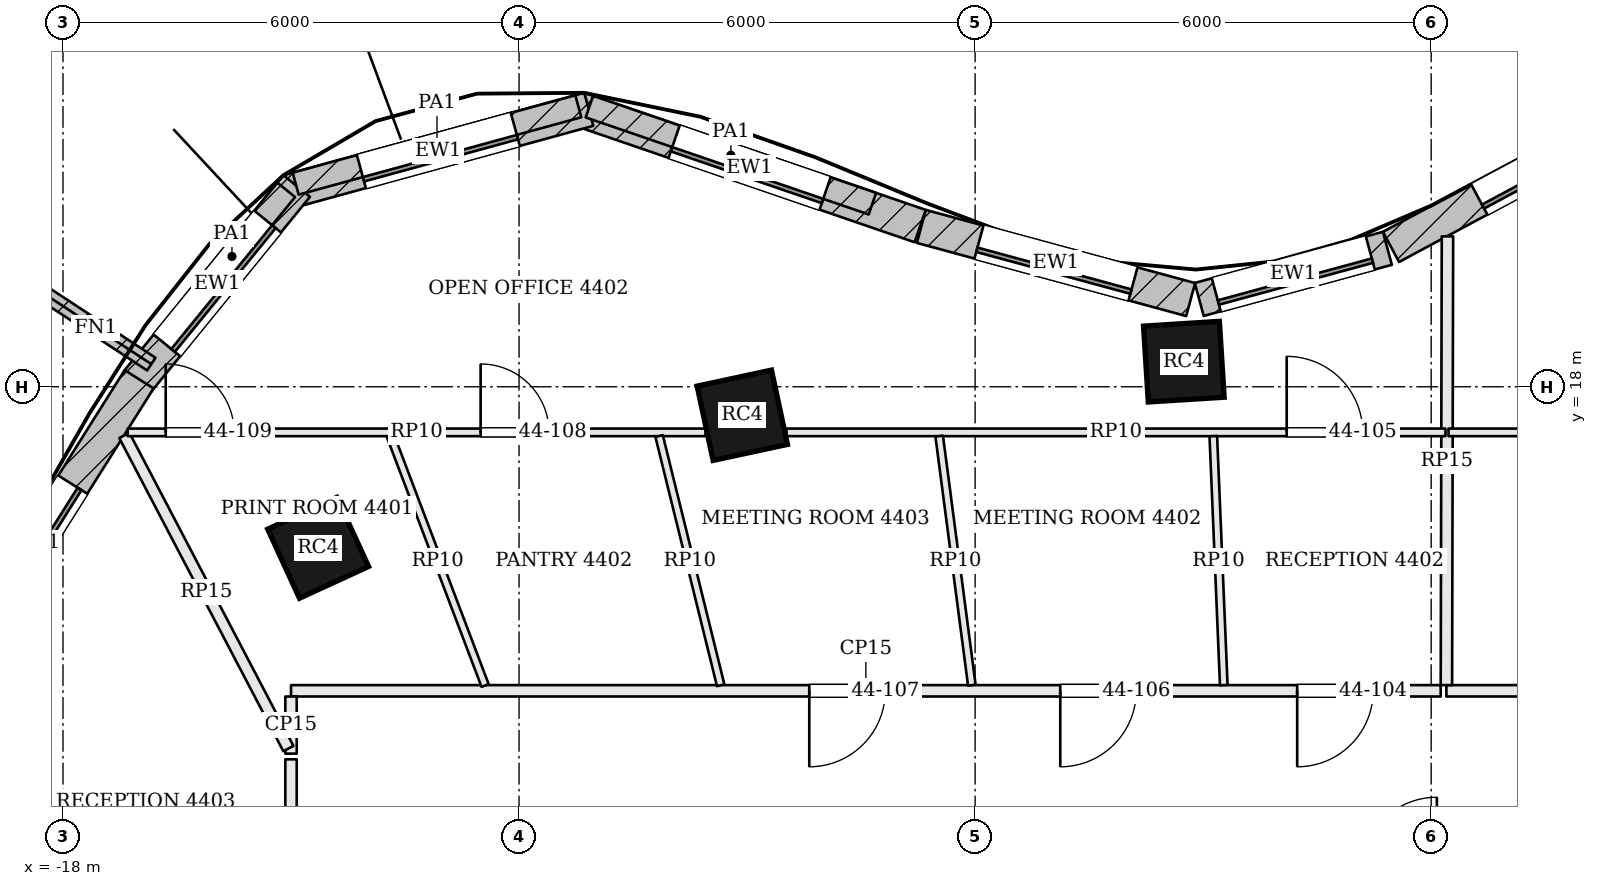
"""IFC4 building model, lengths in metres.
Left out: names, types, materials, properties, quantities, classifications, styles, units other than length and angle.
Written with IfcOpenShell. Run it as: python <this file> out.ifc"""

import sys

from ifc_helpers import new_model, si_unit, direction, frame, frame_2d, origin, origin_2d, place, context, subcontext, project, spatial, rectangle, extrude, element, fill, save


model = new_model("IFC4")
c1 = context("Model", 3, precision=1e-05, world=origin(), true_north=direction((0.0, 1.0)))
c2 = subcontext(c1, "Body", "Model", "MODEL_VIEW")
j1 = project(units=[si_unit("LENGTHUNIT", "METRE"), si_unit("PLANEANGLEUNIT", "RADIAN")], contexts=[c1])
p1 = place(None, origin())
s1 = spatial("IfcSite", under=j1, at=p1, CompositionType="ELEMENT")
p2 = place(p1, origin())
s2 = spatial("IfcBuilding", under=s1, at=p2, CompositionType="ELEMENT")
p3 = place(p2, frame((0.0, 0.0, 181.8)))
s3 = spatial("IfcBuildingStorey", under=s2, at=p3, CompositionType="ELEMENT", Elevation=181.8)
for number, where, z_axis, x_axis in (
    (1, (-3.254, 18.33, 0.0), (0.0, 0.0, 1.0), (-0.998, -0.063, 0.0)),
    (2, (-9.063, 17.625, 0.0), (0.0, 0.0, 1.0), (-0.978, -0.21, 0.0)),
    (3, (-14.643, 15.881, 0.0), (0.0, 0.0, 1.0), (-0.909, -0.417, 0.0)),
):
    element("IfcColumn", number, at=place(p3, frame(where, z_axis=z_axis, x_axis=x_axis)), inside=s3, PredefinedType="COLUMN", context=c2, shape_type="SweptSolid", body=[
        extrude(rectangle(XDim=1.0, YDim=1.0, at=origin_2d()), origin(), (0.0, 0.0, 1.0), 3.9),
    ])
p4 = place(p3, frame((3.646, 22.079, 0.0), z_axis=(0.0, 0.0, 1.0), x_axis=(-0.881279133897, -0.472596115259, 0.0)))
e4 = element("IfcWall", 4, at=p4, inside=s3, PredefinedType="SOLIDWALL", context=c2, shape_type="SweptSolid", body=[
    extrude(rectangle(XDim=4.737, YDim=0.45, at=frame_2d((2.368, 0.0))), origin(), (0.0, 0.0, 1.0), 3.7),
])
p5 = place(p4, frame((1.318, 0.0, 0.9)))
e5 = element("IfcOpeningElement", 5, at=p5, cuts=e4, PredefinedType="OPENING", context=c2, shape_type="SweptSolid", body=[
    extrude(rectangle(XDim=2.1, YDim=2.3, at=frame_2d((1.05, 1.15))), frame((0.0, 0.235, 0.0), z_axis=(0.0, -1.0, 0.0), x_axis=(1.0, 0.0, 0.0)), (0.0, 0.0, 1.0), 0.47),
])
p6 = place(p3, frame((-0.576, 19.821, 0.0), z_axis=(0.0, 0.0, 1.0), x_axis=(-0.965009398019, -0.262215296532, 0.0)))
e6 = element("IfcWall", 6, at=p6, inside=s3, PredefinedType="SOLIDWALL", context=c2, shape_type="SweptSolid", body=[
    extrude(rectangle(XDim=2.565, YDim=0.45, at=frame_2d((1.283, 0.0))), origin(), (0.0, 0.0, 1.0), 3.7),
])
p7 = place(p6, frame((0.233, 0.0, 0.9)))
e7 = element("IfcOpeningElement", 7, at=p7, cuts=e6, PredefinedType="OPENING", context=c2, shape_type="SweptSolid", body=[
    extrude(rectangle(XDim=2.1, YDim=2.3, at=frame_2d((1.05, 1.15))), frame((0.0, 0.235, 0.0), z_axis=(0.0, -1.0, 0.0), x_axis=(1.0, 0.0, 0.0)), (0.0, 0.0, 1.0), 0.47),
])
p8 = place(p3, frame((-3.164, 19.147, 0.0), z_axis=(0.0, 0.0, 1.0), x_axis=(-0.965039479998, 0.262104563191, 0.0)))
e8 = element("IfcWall", 8, at=p8, inside=s3, PredefinedType="SOLIDWALL", context=c2, shape_type="SweptSolid", body=[
    extrude(rectangle(XDim=3.672, YDim=0.45, at=frame_2d((1.836, 0.0))), origin(), (0.0, 0.0, 1.0), 3.7),
])
p9 = place(p8, frame((0.786, 0.0, 0.9)))
e9 = element("IfcOpeningElement", 9, at=p9, cuts=e8, PredefinedType="OPENING", context=c2, shape_type="SweptSolid", body=[
    extrude(rectangle(XDim=2.1, YDim=2.3, at=frame_2d((1.05, 1.15))), frame((0.0, 0.235, 0.0), z_axis=(0.0, -1.0, 0.0), x_axis=(1.0, 0.0, 0.0)), (0.0, 0.0, 1.0), 0.47),
])
p10 = place(p3, frame((-6.723, 20.114, 0.0), z_axis=(0.0, 0.0, 1.0), x_axis=(-0.945947299026, 0.324320377815, 0.0)))
e10 = element("IfcWall", 10, at=p10, inside=s3, PredefinedType="SOLIDWALL", context=c2, shape_type="SweptSolid", body=[
    extrude(rectangle(XDim=4.745, YDim=0.45, at=frame_2d((2.372, 0.0))), origin(), (0.0, 0.0, 1.0), 3.7),
])
p11 = place(p10, frame((1.322, 0.0, 0.9)))
e11 = element("IfcOpeningElement", 11, at=p11, cuts=e10, PredefinedType="OPENING", context=c2, shape_type="SweptSolid", body=[
    extrude(rectangle(XDim=2.1, YDim=2.3, at=frame_2d((1.05, 1.15))), frame((0.0, 0.235, 0.0), z_axis=(0.0, -1.0, 0.0), x_axis=(1.0, 0.0, 0.0)), (0.0, 0.0, 1.0), 0.47),
])
p12 = place(p3, frame((-11.083, 21.65, 0.0), z_axis=(0.0, 0.0, 1.0), x_axis=(-0.964483204983, -0.264144179011, 0.0)))
e12 = element("IfcWall", 12, at=p12, inside=s3, PredefinedType="SOLIDWALL", context=c2, shape_type="SweptSolid", body=[
    extrude(rectangle(XDim=4.104, YDim=0.45, at=frame_2d((2.052, 0.0))), origin(), (0.0, 0.0, 1.0), 3.7),
])
p13 = place(p12, frame((1.002, 0.0, 0.9)))
e13 = element("IfcOpeningElement", 13, at=p13, cuts=e12, PredefinedType="OPENING", context=c2, shape_type="SweptSolid", body=[
    extrude(rectangle(XDim=2.1, YDim=2.3, at=frame_2d((1.05, 1.15))), frame((0.0, 0.235, 0.0), z_axis=(0.0, -1.0, 0.0), x_axis=(1.0, 0.0, 0.0)), (0.0, 0.0, 1.0), 0.47),
])
p14 = place(p3, frame((-14.926, 20.641, 0.0), z_axis=(0.0, 0.0, 1.0), x_axis=(-0.631548074669, -0.775336720001, 0.0)))
e14 = element("IfcWall", 14, at=p14, inside=s3, PredefinedType="SOLIDWALL", context=c2, shape_type="SweptSolid", body=[
    extrude(rectangle(XDim=3.308, YDim=0.45, at=frame_2d((1.654, 0.0))), origin(), (0.0, 0.0, 1.0), 3.7),
])
p15 = place(p14, frame((0.604, 0.0, 0.9)))
e15 = element("IfcOpeningElement", 15, at=p15, cuts=e14, PredefinedType="OPENING", context=c2, shape_type="SweptSolid", body=[
    extrude(rectangle(XDim=2.1, YDim=2.3, at=frame_2d((1.05, 1.15))), frame((0.0, 0.235, 0.0), z_axis=(0.0, -1.0, 0.0), x_axis=(1.0, 0.0, 0.0)), (0.0, 0.0, 1.0), 0.47),
])
p16 = place(p3, frame((-16.998, 18.099, 0.0), z_axis=(0.0, 0.0, 1.0), x_axis=(-0.532745661304, -0.846275404559, 0.0)))
e16 = element("IfcWall", 16, at=p16, inside=s3, PredefinedType="SOLIDWALL", context=c2, shape_type="SweptSolid", body=[
    extrude(rectangle(XDim=5.076, YDim=0.45, at=frame_2d((2.538, 0.0))), origin(), (0.0, 0.0, 1.0), 3.7),
])
p17 = place(p16, frame((1.638, 0.0, 0.9)))
e17 = element("IfcOpeningElement", 17, at=p17, cuts=e16, PredefinedType="OPENING", context=c2, shape_type="SweptSolid", body=[
    extrude(rectangle(XDim=1.8, YDim=2.3, at=frame_2d((0.9, 1.15))), frame((0.0, 0.235, 0.0), z_axis=(0.0, -1.0, 0.0), x_axis=(1.0, 0.0, 0.0)), (0.0, 0.0, 1.0), 0.47),
])
p18 = place(p3, frame((-16.838, 18.298, 0.0), z_axis=(0.0, 0.0, 1.0), x_axis=(-0.835871900419, 0.548924554097, 0.0)))
e18 = element("IfcWall", 18, at=p18, inside=s3, PredefinedType="SOLIDWALL", context=c2, shape_type="SweptSolid", body=[
    extrude(rectangle(XDim=1.75, YDim=0.2, at=frame_2d((0.875, 0.0))), origin(), (0.0, 0.0, 1.0), 3.7),
])
p19 = place(p3, frame((-7.352, 20.409, 3.9), z_axis=(0.0, 0.0, 1.0), x_axis=(-0.945937789937, 0.32434811171, 0.0)))
e19 = element("IfcWall", 19, at=p19, inside=s3, PredefinedType="PARAPET", context=c2, shape_type="SweptSolid", body=[
    extrude(rectangle(XDim=3.936, YDim=0.3, at=frame_2d((1.968, 0.0))), origin(), (0.0, 0.0, 1.0), 1.1),
])
p20 = place(p3, frame((-11.22, 21.69, 3.9), z_axis=(0.0, 0.0, 1.0), x_axis=(-0.964484148392, -0.264140734271, 0.0)))
e20 = element("IfcWall", 20, at=p20, inside=s3, PredefinedType="PARAPET", context=c2, shape_type="SweptSolid", body=[
    extrude(rectangle(XDim=3.855, YDim=0.3, at=frame_2d((1.928, 0.0))), origin(), (0.0, 0.0, 1.0), 1.1),
])
p21 = place(p3, frame((-15.063, 20.591, 3.9), z_axis=(0.0, 0.0, 1.0), x_axis=(-0.631559943447, -0.775327052174, 0.0)))
e21 = element("IfcWall", 21, at=p21, inside=s3, PredefinedType="PARAPET", context=c2, shape_type="SweptSolid", body=[
    extrude(rectangle(XDim=2.26, YDim=0.3, at=frame_2d((1.13, 0.0))), origin(), (0.0, 0.0, 1.0), 1.1),
])
p22 = place(p3, frame((14.925, 14.0, 0.0), z_axis=(0.0, 0.0, 1.0), x_axis=(-1.0, 0.0, 0.0)))
e22 = element("IfcWall", 22, at=p22, inside=s3, PredefinedType="PARTITIONING", context=c2, shape_type="SweptSolid", body=[
    extrude(rectangle(XDim=14.725, YDim=0.15, at=frame_2d((7.362, 0.0))), origin(), (0.0, 0.0, 1.0), 3.084),
])
p23 = place(p22, frame((5.495, 0.0, 0.0)))
e23 = element("IfcOpeningElement", 23, at=p23, cuts=e22, PredefinedType="OPENING", context=c2, shape_type="SweptSolid", body=[
    extrude(rectangle(XDim=1.0, YDim=2.4, at=frame_2d((0.5, 1.2))), frame((0.0, 0.085, 0.0), z_axis=(0.0, -1.0, 0.0), x_axis=(1.0, 0.0, 0.0)), (0.0, 0.0, 1.0), 0.17),
])
p24 = place(p22, frame((11.15, 0.0, 0.0)))
e24 = element("IfcOpeningElement", 24, at=p24, cuts=e22, PredefinedType="OPENING", context=c2, shape_type="SweptSolid", body=[
    extrude(rectangle(XDim=1.0, YDim=2.1, at=frame_2d((0.5, 1.05))), frame((0.0, 0.085, 0.0), z_axis=(0.0, -1.0, 0.0), x_axis=(1.0, 0.0, 0.0)), (0.0, 0.0, 1.0), 0.17),
])
p25 = place(p3, frame((0.214, 19.979, 0.0), z_axis=(0.0, 0.0, 1.0), x_axis=(-0.002357118586, -0.999997221992, 0.0)))
e25 = element("IfcWall", 25, at=p25, inside=s3, PredefinedType="PARTITIONING", context=c2, shape_type="SweptSolid", body=[
    extrude(rectangle(XDim=5.904, YDim=0.15, at=frame_2d((2.952, 0.0))), origin(), (0.0, 0.0, 1.0), 3.234),
])
p26 = place(p3, frame((0.125, 14.0, 0.0), z_axis=(0.0, 0.0, 1.0), x_axis=(-1.0, 0.0, 0.0)))
e26 = element("IfcWall", 26, at=p26, inside=s3, PredefinedType="PARTITIONING", context=c2, shape_type="SweptSolid", body=[
    extrude(rectangle(XDim=15.125, YDim=0.15, at=frame_2d((7.562, 0.0))), origin(), (0.0, 0.0, 1.0), 3.084),
])
p27 = place(p26, frame((0.888, 0.0, 0.0)))
e27 = element("IfcOpeningElement", 27, at=p27, cuts=e26, PredefinedType="OPENING", context=c2, shape_type="SweptSolid", body=[
    extrude(rectangle(XDim=1.0, YDim=2.1, at=frame_2d((0.5, 1.05))), frame((0.0, 0.085, 0.0), z_axis=(0.0, -1.0, 0.0), x_axis=(1.0, 0.0, 0.0)), (0.0, 0.0, 1.0), 0.17),
])
p28 = place(p26, frame((4.005, 0.0, 0.0)))
e28 = element("IfcOpeningElement", 28, at=p28, cuts=e26, PredefinedType="OPENING", context=c2, shape_type="SweptSolid", body=[
    extrude(rectangle(XDim=1.0, YDim=2.4, at=frame_2d((0.5, 1.2))), frame((0.0, 0.085, 0.0), z_axis=(0.0, -1.0, 0.0), x_axis=(1.0, 0.0, 0.0)), (0.0, 0.0, 1.0), 0.17),
])
p29 = place(p26, frame((7.307, 0.0, 0.0)))
e29 = element("IfcOpeningElement", 29, at=p29, cuts=e26, PredefinedType="OPENING", context=c2, shape_type="SweptSolid", body=[
    extrude(rectangle(XDim=1.0, YDim=2.4, at=frame_2d((0.5, 1.2))), frame((0.0, 0.085, 0.0), z_axis=(0.0, -1.0, 0.0), x_axis=(1.0, 0.0, 0.0)), (0.0, 0.0, 1.0), 0.17),
])
p30 = place(p3, frame((-15.0, 13.925, 0.0), z_axis=(0.0, 0.0, 1.0), x_axis=(0.0, -1.0, 0.0)))
e30 = element("IfcWall", 30, at=p30, inside=s3, PredefinedType="PARTITIONING", context=c2, shape_type="SweptSolid", body=[
    extrude(rectangle(XDim=0.751, YDim=0.15, at=frame_2d((0.376, 0.0))), origin(), (0.0, 0.0, 1.0), 3.084),
])
p31 = place(p3, frame((-17.193, 17.36, 0.0), z_axis=(0.0, 0.0, 1.0), x_axis=(0.463995225493, -0.885837699988, 0.0)))
e31 = element("IfcWall", 31, at=p31, inside=s3, PredefinedType="PARTITIONING", context=c2, shape_type="SweptSolid", body=[
    extrude(rectangle(XDim=4.651, YDim=0.15, at=frame_2d((2.325, 0.0))), origin(), (0.0, 0.0, 1.0), 3.234),
])
p32 = place(p3, frame((-15.0, 13.099, 0.0), z_axis=(0.0, 0.0, 1.0), x_axis=(0.0, -1.0, 0.0)))
e32 = element("IfcWall", 32, at=p32, inside=s3, PredefinedType="PARTITIONING", context=c2, shape_type="SweptSolid", body=[
    extrude(rectangle(XDim=2.977, YDim=0.15, at=frame_2d((1.489, 0.0))), origin(), (0.0, 0.0, 1.0), 3.084),
])
p33 = place(p3, frame((0.228, 17.4, 0.0), z_axis=(0.0, 0.0, 1.0), x_axis=(1.0, 0.0, 0.0)))
e33 = element("IfcWall", 33, at=p33, inside=s3, PredefinedType="PARTITIONING", context=c2, shape_type="SweptSolid", body=[
    extrude(rectangle(XDim=7.596, YDim=0.1, at=frame_2d((3.798, 0.0))), origin(), (0.0, 0.0, 1.0), 3.084),
])
p34 = place(p33, frame((3.894, 0.0, 0.0)))
e34 = element("IfcOpeningElement", 34, at=p34, cuts=e33, PredefinedType="OPENING", context=c2, shape_type="SweptSolid", body=[
    extrude(rectangle(XDim=0.9, YDim=2.1, at=frame_2d((0.45, 1.05))), frame((0.0, 0.06, 0.0), z_axis=(0.0, -1.0, 0.0), x_axis=(1.0, 0.0, 0.0)), (0.0, 0.0, 1.0), 0.12),
])
p35 = place(p3, frame((-17.149, 17.4, 0.0), z_axis=(0.0, 0.0, 1.0), x_axis=(1.0, 0.0, 0.0)))
e35 = element("IfcWall", 35, at=p35, inside=s3, PredefinedType="PARTITIONING", context=c2, shape_type="SweptSolid", body=[
    extrude(rectangle(XDim=7.602, YDim=0.1, at=frame_2d((3.801, 0.0))), origin(), (0.0, 0.0, 1.0), 3.084),
])
p36 = place(p35, frame((4.643, 0.0, 0.0)))
e36 = element("IfcOpeningElement", 36, at=p36, cuts=e35, PredefinedType="OPENING", context=c2, shape_type="SweptSolid", body=[
    extrude(rectangle(XDim=0.9, YDim=2.1, at=frame_2d((0.45, 1.05))), frame((0.0, 0.06, 0.0), z_axis=(0.0, -1.0, 0.0), x_axis=(1.0, 0.0, 0.0)), (0.0, 0.0, 1.0), 0.12),
])
p37 = place(p35, frame((0.5, 0.0, 0.0)))
e37 = element("IfcOpeningElement", 37, at=p37, cuts=e35, PredefinedType="OPENING", context=c2, shape_type="SweptSolid", body=[
    extrude(rectangle(XDim=0.9, YDim=2.1, at=frame_2d((0.45, 1.05))), frame((0.0, 0.06, 0.0), z_axis=(0.0, -1.0, 0.0), x_axis=(1.0, 0.0, 0.0)), (0.0, 0.0, 1.0), 0.12),
])
p38 = place(p3, frame((-8.483, 17.4, 0.0), z_axis=(0.0, 0.0, 1.0), x_axis=(1.0, 0.0, 0.0)))
e38 = element("IfcWall", 38, at=p38, inside=s3, PredefinedType="PARTITIONING", context=c2, shape_type="SweptSolid", body=[
    extrude(rectangle(XDim=8.671, YDim=0.1, at=frame_2d((4.335, 0.0))), origin(), (0.0, 0.0, 1.0), 3.084),
])
p39 = place(p38, frame((6.582, 0.0, 0.0)))
e39 = element("IfcOpeningElement", 39, at=p39, cuts=e38, PredefinedType="OPENING", context=c2, shape_type="SweptSolid", body=[
    extrude(rectangle(XDim=1.0, YDim=2.1, at=frame_2d((0.5, 1.05))), frame((0.0, 0.06, 0.0), z_axis=(0.0, -1.0, 0.0), x_axis=(1.0, 0.0, 0.0)), (0.0, 0.0, 1.0), 0.12),
])
p40 = place(p3, frame((-2.729, 14.075, 0.0), z_axis=(0.0, 0.0, 1.0), x_axis=(-0.042005382394, 0.99911738442, 0.0)))
e40 = element("IfcWall", 40, at=p40, inside=s3, PredefinedType="PARTITIONING", context=c2, shape_type="SweptSolid", body=[
    extrude(rectangle(XDim=3.278, YDim=0.1, at=frame_2d((1.639, 0.0))), origin(), (0.0, 0.0, 1.0), 3.084),
])
p41 = place(p3, frame((-6.043, 14.074, 0.0), z_axis=(0.0, 0.0, 1.0), x_axis=(-0.12990779889, 0.991526078219, 0.0)))
e41 = element("IfcWall", 41, at=p41, inside=s3, PredefinedType="PARTITIONING", context=c2, shape_type="SweptSolid", body=[
    extrude(rectangle(XDim=3.304, YDim=0.1, at=frame_2d((1.652, 0.0))), origin(), (0.0, 0.0, 1.0), 3.084),
])
p42 = place(p3, frame((-9.347, 14.073, 0.0), z_axis=(0.0, 0.0, 1.0), x_axis=(-0.239847329474, 0.970810619299, 0.0)))
e42 = element("IfcWall", 42, at=p42, inside=s3, PredefinedType="PARTITIONING", context=c2, shape_type="SweptSolid", body=[
    extrude(rectangle(XDim=3.377, YDim=0.1, at=frame_2d((1.689, 0.0))), origin(), (0.0, 0.0, 1.0), 3.084),
])
p43 = place(p3, frame((-12.447, 14.07, 0.0), z_axis=(0.0, 0.0, 1.0), x_axis=(-0.354534757725, 0.935042836219, 0.0)))
e43 = element("IfcWall", 43, at=p43, inside=s3, PredefinedType="PARTITIONING", context=c2, shape_type="SweptSolid", body=[
    extrude(rectangle(XDim=3.511, YDim=0.1, at=frame_2d((1.756, 0.0))), origin(), (0.0, 0.0, 1.0), 3.084),
])
p44 = place(p5, origin())
e44 = element("IfcWindow", 44, at=p44, inside=s3, PartitioningType="SINGLE_PANEL", PredefinedType="WINDOW", context=c2, shape_type="SweptSolid", body=[
    extrude(rectangle(XDim=2.1, YDim=2.3, at=frame_2d((1.05, 1.15))), frame((0.0, 0.135, 0.0), z_axis=(0.0, -1.0, 0.0), x_axis=(1.0, 0.0, 0.0)), (0.0, 0.0, 1.0), 0.06),
])
fill(e5, e44)
p45 = place(p7, origin())
e45 = element("IfcWindow", 45, at=p45, inside=s3, PartitioningType="SINGLE_PANEL", PredefinedType="WINDOW", context=c2, shape_type="SweptSolid", body=[
    extrude(rectangle(XDim=2.1, YDim=2.3, at=frame_2d((1.05, 1.15))), frame((0.0, 0.135, 0.0), z_axis=(0.0, -1.0, 0.0), x_axis=(1.0, 0.0, 0.0)), (0.0, 0.0, 1.0), 0.06),
])
fill(e7, e45)
p46 = place(p9, origin())
e46 = element("IfcWindow", 46, at=p46, inside=s3, PartitioningType="SINGLE_PANEL", PredefinedType="WINDOW", context=c2, shape_type="SweptSolid", body=[
    extrude(rectangle(XDim=2.1, YDim=2.3, at=frame_2d((1.05, 1.15))), frame((0.0, 0.135, 0.0), z_axis=(0.0, -1.0, 0.0), x_axis=(1.0, 0.0, 0.0)), (0.0, 0.0, 1.0), 0.06),
])
fill(e9, e46)
p47 = place(p11, origin())
e47 = element("IfcWindow", 47, at=p47, inside=s3, PartitioningType="SINGLE_PANEL", PredefinedType="WINDOW", context=c2, shape_type="SweptSolid", body=[
    extrude(rectangle(XDim=2.1, YDim=2.3, at=frame_2d((1.05, 1.15))), frame((0.0, 0.135, 0.0), z_axis=(0.0, -1.0, 0.0), x_axis=(1.0, 0.0, 0.0)), (0.0, 0.0, 1.0), 0.06),
])
fill(e11, e47)
p48 = place(p13, origin())
e48 = element("IfcWindow", 48, at=p48, inside=s3, PartitioningType="SINGLE_PANEL", PredefinedType="WINDOW", context=c2, shape_type="SweptSolid", body=[
    extrude(rectangle(XDim=2.1, YDim=2.3, at=frame_2d((1.05, 1.15))), frame((0.0, 0.135, 0.0), z_axis=(0.0, -1.0, 0.0), x_axis=(1.0, 0.0, 0.0)), (0.0, 0.0, 1.0), 0.06),
])
fill(e13, e48)
p49 = place(p15, origin())
e49 = element("IfcWindow", 49, at=p49, inside=s3, PartitioningType="SINGLE_PANEL", PredefinedType="WINDOW", context=c2, shape_type="SweptSolid", body=[
    extrude(rectangle(XDim=2.1, YDim=2.3, at=frame_2d((1.05, 1.15))), frame((0.0, 0.135, 0.0), z_axis=(0.0, -1.0, 0.0), x_axis=(1.0, 0.0, 0.0)), (0.0, 0.0, 1.0), 0.06),
])
fill(e15, e49)
p50 = place(p17, origin())
e50 = element("IfcWindow", 50, at=p50, inside=s3, PartitioningType="SINGLE_PANEL", PredefinedType="WINDOW", context=c2, shape_type="SweptSolid", body=[
    extrude(rectangle(XDim=1.8, YDim=2.3, at=frame_2d((0.9, 1.15))), frame((0.0, 0.135, 0.0), z_axis=(0.0, -1.0, 0.0), x_axis=(1.0, 0.0, 0.0)), (0.0, 0.0, 1.0), 0.06),
])
fill(e17, e50)
p51 = place(p27, origin())
e51 = element("IfcDoor", 51, at=p51, inside=s3, OperationType="SINGLE_SWING_RIGHT", PredefinedType="DOOR", context=c2, shape_type="SweptSolid", body=[
    extrude(rectangle(XDim=1.0, YDim=2.1, at=frame_2d((0.5, 1.05))), frame((0.0, 0.025, 0.0), z_axis=(0.0, -1.0, 0.0), x_axis=(1.0, 0.0, 0.0)), (0.0, 0.0, 1.0), 0.05),
])
fill(e27, e51)
p52 = place(p39, origin())
e52 = element("IfcDoor", 52, at=p52, inside=s3, OperationType="SINGLE_SWING_LEFT", PredefinedType="DOOR", context=c2, shape_type="SweptSolid", body=[
    extrude(rectangle(XDim=1.0, YDim=2.1, at=frame_2d((0.5, 1.05))), frame((0.0, 0.025, 0.0), z_axis=(0.0, -1.0, 0.0), x_axis=(1.0, 0.0, 0.0)), (0.0, 0.0, 1.0), 0.05),
])
fill(e39, e52)
p53 = place(p28, origin())
e53 = element("IfcDoor", 53, at=p53, inside=s3, OperationType="SINGLE_SWING_RIGHT", PredefinedType="DOOR", context=c2, shape_type="SweptSolid", body=[
    extrude(rectangle(XDim=1.0, YDim=2.4, at=frame_2d((0.5, 1.2))), frame((0.0, 0.025, 0.0), z_axis=(0.0, -1.0, 0.0), x_axis=(1.0, 0.0, 0.0)), (0.0, 0.0, 1.0), 0.05),
])
fill(e28, e53)
p54 = place(p29, origin())
e54 = element("IfcDoor", 54, at=p54, inside=s3, OperationType="SINGLE_SWING_RIGHT", PredefinedType="DOOR", context=c2, shape_type="SweptSolid", body=[
    extrude(rectangle(XDim=1.0, YDim=2.4, at=frame_2d((0.5, 1.2))), frame((0.0, 0.025, 0.0), z_axis=(0.0, -1.0, 0.0), x_axis=(1.0, 0.0, 0.0)), (0.0, 0.0, 1.0), 0.05),
])
fill(e29, e54)
p55 = place(p36, origin())
e55 = element("IfcDoor", 55, at=p55, inside=s3, OperationType="SINGLE_SWING_LEFT", PredefinedType="DOOR", context=c2, shape_type="SweptSolid", body=[
    extrude(rectangle(XDim=0.9, YDim=2.1, at=frame_2d((0.45, 1.05))), frame((0.0, 0.025, 0.0), z_axis=(0.0, -1.0, 0.0), x_axis=(1.0, 0.0, 0.0)), (0.0, 0.0, 1.0), 0.05),
])
fill(e36, e55)
p56 = place(p37, origin())
e56 = element("IfcDoor", 56, at=p56, inside=s3, OperationType="SINGLE_SWING_LEFT", PredefinedType="DOOR", context=c2, shape_type="SweptSolid", body=[
    extrude(rectangle(XDim=0.9, YDim=2.1, at=frame_2d((0.45, 1.05))), frame((0.0, 0.025, 0.0), z_axis=(0.0, -1.0, 0.0), x_axis=(1.0, 0.0, 0.0)), (0.0, 0.0, 1.0), 0.05),
])
fill(e37, e56)
save(model, sys.argv[1])
